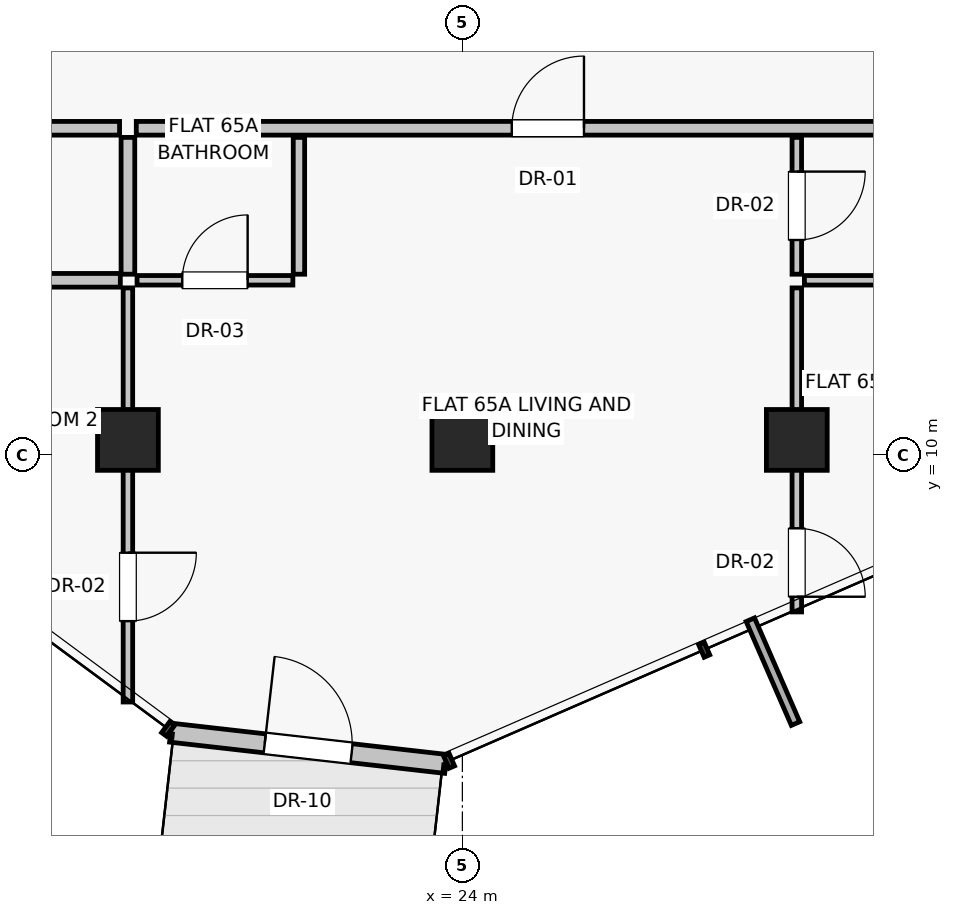
"""IFC4 building model, lengths in metres.
Left out: names, types, materials, properties, quantities, classifications, styles, units other than length and angle.
Written with IfcOpenShell. Run it as: python <this file> out.ifc"""

import sys

from ifc_helpers import new_model, si_unit, direction, frame, frame_2d, origin, origin_2d, place, context, subcontext, project, spatial, rectangle, extrude, source, transform, mapped, element, fill, save


model = new_model("IFC4")
c1 = context("Model", 3, precision=1e-05, world=origin(), true_north=direction((0.0, 1.0)))
c2 = subcontext(c1, "Body", "Model", "MODEL_VIEW")
j1 = project(units=[si_unit("LENGTHUNIT", "METRE"), si_unit("PLANEANGLEUNIT", "RADIAN")], contexts=[c1])
p1 = place(None, origin())
s1 = spatial("IfcSite", under=j1, at=p1, CompositionType="ELEMENT")
p2 = place(p1, origin())
s2 = spatial("IfcBuilding", under=s1, at=p2, CompositionType="ELEMENT")
p3 = place(p2, frame((0.0, 0.0, 230.05)))
s3 = spatial("IfcBuildingStorey", under=s2, at=p3, CompositionType="ELEMENT", Elevation=230.05)
for number, where, z_axis, x_axis in (
    (1, (19.6, 10.2, -0.235), (0.0, 0.0, 1.0), (1.0, 0.0, 0.0)),
    (2, (24.0, 10.2, -0.235), (0.0, 0.0, 1.0), (1.0, 0.0, 0.0)),
    (3, (28.4, 10.2, -0.235), (0.0, 0.0, 1.0), (1.0, 0.0, 0.0)),
):
    element("IfcColumn", number, at=place(p3, frame(where, z_axis=z_axis, x_axis=x_axis)), inside=s3, PredefinedType="COLUMN", context=c2, shape_type="SweptSolid", body=[
        extrude(rectangle(XDim=0.8, YDim=0.8, at=origin_2d()), origin(), (0.0, 0.0, 1.0), 3.485),
    ])
p4 = place(p3, frame((20.162, 6.349, 0.0), z_axis=(0.0, 0.0, 1.0), x_axis=(0.993617723706, -0.112799907521, 0.0)))
e4 = element("IfcWall", 4, at=p4, inside=s3, PredefinedType="SOLIDWALL", context=c2, shape_type="SweptSolid", body=[
    extrude(rectangle(XDim=3.643, YDim=0.25, at=frame_2d((1.821, 0.0))), origin(), (0.0, 0.0, 1.0), 3.015),
])
p5 = place(p4, frame((1.246, 0.0, 0.0)))
e5 = element("IfcOpeningElement", 5, at=p5, cuts=e4, PredefinedType="OPENING", context=c2, shape_type="SweptSolid", body=[
    extrude(rectangle(XDim=1.15, YDim=2.25, at=frame_2d((0.575, 1.125))), frame((0.0, 0.135, 0.0), z_axis=(0.0, -1.0, 0.0), x_axis=(1.0, 0.0, 0.0)), (0.0, 0.0, 1.0), 0.27),
])
p6 = place(p3, frame((15.31, 14.3, 0.0), z_axis=(0.0, 0.0, 1.0), x_axis=(1.0, 0.0, 0.0)))
e6 = element("IfcWall", 6, at=p6, inside=s3, PredefinedType="PARTITIONING", context=c2, shape_type="SweptSolid", body=[
    extrude(rectangle(XDim=4.18, YDim=0.18, at=frame_2d((2.09, 0.0))), origin(), (0.0, 0.0, 1.0), 3.015),
])
p7 = place(p6, frame((1.59, 0.0, 0.0)))
e7 = element("IfcOpeningElement", 7, at=p7, cuts=e6, PredefinedType="OPENING", context=c2, shape_type="SweptSolid", body=[
    extrude(rectangle(XDim=1.0, YDim=2.01, at=frame_2d((0.5, 1.005))), frame((0.0, 0.1, 0.0), z_axis=(0.0, -1.0, 0.0), x_axis=(1.0, 0.0, 0.0)), (0.0, 0.0, 1.0), 0.2),
])
p8 = place(p3, frame((19.71, 14.3, 0.0), z_axis=(0.0, 0.0, 1.0), x_axis=(1.0, 0.0, 0.0)))
e8 = element("IfcWall", 8, at=p8, inside=s3, PredefinedType="PARTITIONING", context=c2, shape_type="SweptSolid", body=[
    extrude(rectangle(XDim=11.38, YDim=0.18, at=frame_2d((5.69, 0.0))), origin(), (0.0, 0.0, 1.0), 3.015),
])
p9 = place(p8, frame((4.94, 0.0, 0.0)))
e9 = element("IfcOpeningElement", 9, at=p9, cuts=e8, PredefinedType="OPENING", context=c2, shape_type="SweptSolid", body=[
    extrude(rectangle(XDim=0.95, YDim=2.02, at=frame_2d((0.475, 1.01))), frame((0.0, 0.1, 0.0), z_axis=(0.0, -1.0, 0.0), x_axis=(1.0, 0.0, 0.0)), (0.0, 0.0, 1.0), 0.2),
])
p10 = place(p3, frame((15.32, 12.3, 0.0), z_axis=(0.0, 0.0, 1.0), x_axis=(1.0, 0.0, 0.0)))
e10 = element("IfcWall", 10, at=p10, inside=s3, PredefinedType="PARTITIONING", context=c2, shape_type="SweptSolid", body=[
    extrude(rectangle(XDim=4.18, YDim=0.18, at=frame_2d((2.09, 0.0))), origin(), (0.0, 0.0, 1.0), 3.015),
])
p11 = place(p3, frame((19.6, 14.18, 0.0), z_axis=(0.0, 0.0, 1.0), x_axis=(0.0, -1.0, 0.0)))
e11 = element("IfcWall", 11, at=p11, inside=s3, PredefinedType="PARTITIONING", context=c2, shape_type="SweptSolid", body=[
    extrude(rectangle(XDim=1.8, YDim=0.18, at=frame_2d((0.9, 0.0))), origin(), (0.0, 0.0, 1.0), 2.543),
])
p12 = place(p3, frame((19.6, 12.2, 0.0), z_axis=(0.0, 0.0, 1.0), x_axis=(0.0, -1.0, 0.0)))
e12 = element("IfcWall", 12, at=p12, inside=s3, PredefinedType="PARTITIONING", context=c2, shape_type="SweptSolid", body=[
    extrude(rectangle(XDim=5.448, YDim=0.125, at=frame_2d((2.724, 0.0))), origin(), (0.0, 0.0, 1.0), 2.543),
])
p13 = place(p12, frame((3.484, 0.0, 0.0)))
e13 = element("IfcOpeningElement", 13, at=p13, cuts=e12, PredefinedType="OPENING", context=c2, shape_type="SweptSolid", body=[
    extrude(rectangle(XDim=0.9, YDim=2.01, at=frame_2d((0.45, 1.005))), frame((0.0, 0.073, 0.0), z_axis=(0.0, -1.0, 0.0), x_axis=(1.0, 0.0, 0.0)), (0.0, 0.0, 1.0), 0.145),
])
p14 = place(p3, frame((21.85, 14.18, 0.0), z_axis=(0.0, 0.0, 1.0), x_axis=(0.0, -1.0, 0.0)))
e14 = element("IfcWall", 14, at=p14, inside=s3, PredefinedType="PARTITIONING", context=c2, shape_type="SweptSolid", body=[
    extrude(rectangle(XDim=1.8, YDim=0.15, at=frame_2d((0.9, 0.0))), origin(), (0.0, 0.0, 1.0), 3.015),
])
p15 = place(p3, frame((19.72, 12.3, 0.0), z_axis=(0.0, 0.0, 1.0), x_axis=(1.0, 0.0, 0.0)))
e15 = element("IfcWall", 15, at=p15, inside=s3, PredefinedType="PARTITIONING", context=c2, shape_type="SweptSolid", body=[
    extrude(rectangle(XDim=2.05, YDim=0.125, at=frame_2d((1.025, 0.0))), origin(), (0.0, 0.0, 1.0), 3.015),
])
p16 = place(p15, frame((0.595, 0.0, 0.0)))
e16 = element("IfcOpeningElement", 16, at=p16, cuts=e15, PredefinedType="OPENING", context=c2, shape_type="SweptSolid", body=[
    extrude(rectangle(XDim=0.86, YDim=2.01, at=frame_2d((0.43, 1.005))), frame((0.0, 0.073, 0.0), z_axis=(0.0, -1.0, 0.0), x_axis=(1.0, 0.0, 0.0)), (0.0, 0.0, 1.0), 0.145),
])
p17 = place(p3, frame((28.4, 14.18, 0.0), z_axis=(0.0, 0.0, 1.0), x_axis=(0.0, -1.0, 0.0)))
e17 = element("IfcWall", 17, at=p17, inside=s3, PredefinedType="PARTITIONING", context=c2, shape_type="SweptSolid", body=[
    extrude(rectangle(XDim=1.8, YDim=0.125, at=frame_2d((0.9, 0.0))), origin(), (0.0, 0.0, 1.0), 3.015),
])
p18 = place(p17, frame((0.45, 0.0, 0.0)))
e18 = element("IfcOpeningElement", 18, at=p18, cuts=e17, PredefinedType="OPENING", context=c2, shape_type="SweptSolid", body=[
    extrude(rectangle(XDim=0.9, YDim=2.01, at=frame_2d((0.45, 1.005))), frame((0.0, 0.073, 0.0), z_axis=(0.0, -1.0, 0.0), x_axis=(1.0, 0.0, 0.0)), (0.0, 0.0, 1.0), 0.145),
])
p19 = place(p3, frame((28.5, 12.3, 0.0), z_axis=(0.0, 0.0, 1.0), x_axis=(1.0, 0.0, 0.0)))
e19 = element("IfcWall", 19, at=p19, inside=s3, PredefinedType="PARTITIONING", context=c2, shape_type="SweptSolid", body=[
    extrude(rectangle(XDim=2.58, YDim=0.125, at=frame_2d((1.29, 0.0))), origin(), (0.0, 0.0, 1.0), 3.015),
])
p20 = place(p3, frame((28.4, 12.2, 0.0), z_axis=(0.0, 0.0, 1.0), x_axis=(0.0, -1.0, 0.0)))
e20 = element("IfcWall", 20, at=p20, inside=s3, PredefinedType="PARTITIONING", context=c2, shape_type="SweptSolid", body=[
    extrude(rectangle(XDim=4.263, YDim=0.125, at=frame_2d((2.131, 0.0))), origin(), (0.0, 0.0, 1.0), 3.015),
])
p21 = place(p20, frame((3.163, 0.0, 0.0)))
e21 = element("IfcOpeningElement", 21, at=p21, cuts=e20, PredefinedType="OPENING", context=c2, shape_type="SweptSolid", body=[
    extrude(rectangle(XDim=0.9, YDim=2.01, at=frame_2d((0.45, 1.005))), frame((0.0, 0.073, 0.0), z_axis=(0.0, -1.0, 0.0), x_axis=(1.0, 0.0, 0.0)), (0.0, 0.0, 1.0), 0.145),
])
m1 = source(origin(), c2, "Body", "SweptSolid", [
    extrude(rectangle(XDim=1.15, YDim=2.25, at=frame_2d((0.575, 1.125))), frame((0.0, 0.025, 0.0), z_axis=(0.0, -1.0, 0.0), x_axis=(1.0, 0.0, 0.0)), (0.0, 0.0, 1.0), 0.05),
])
p22 = place(p5, frame((1.15, 0.0, 0.0), z_axis=(0.0, 0.0, 1.0), x_axis=(-1.0, 0.0, 0.0)))
e22 = element("IfcDoor", 22, at=p22, inside=s3, OperationType="SINGLE_SWING_LEFT", PredefinedType="DOOR", context=c2, shape_type="MappedRepresentation", body=[
    mapped(m1, transform((0.0, 0.0, 0.0), scale=1.0)),
])
fill(e5, e22)
m2 = source(origin(), c2, "Body", "SweptSolid", [
    extrude(rectangle(XDim=0.95, YDim=2.02, at=frame_2d((0.475, 1.01))), frame((0.0, 0.025, 0.0), z_axis=(0.0, -1.0, 0.0), x_axis=(1.0, 0.0, 0.0)), (0.0, 0.0, 1.0), 0.05),
])
p23 = place(p9, origin())
e23 = element("IfcDoor", 23, at=p23, inside=s3, OperationType="SINGLE_SWING_RIGHT", PredefinedType="DOOR", context=c2, shape_type="MappedRepresentation", body=[
    mapped(m2, transform((0.0, 0.0, 0.0), scale=1.0)),
])
fill(e9, e23)
m3 = source(origin(), c2, "Body", "SweptSolid", [
    extrude(rectangle(XDim=0.9, YDim=2.01, at=frame_2d((0.45, 1.005))), frame((0.0, 0.025, 0.0), z_axis=(0.0, -1.0, 0.0), x_axis=(1.0, 0.0, 0.0)), (0.0, 0.0, 1.0), 0.05),
])
p24 = place(p13, origin())
e24 = element("IfcDoor", 24, at=p24, inside=s3, OperationType="SINGLE_SWING_LEFT", PredefinedType="DOOR", context=c2, shape_type="MappedRepresentation", body=[
    mapped(m3, transform((0.0, 0.0, 0.0), scale=1.0)),
])
fill(e13, e24)
m4 = source(origin(), c2, "Body", "SweptSolid", [
    extrude(rectangle(XDim=0.86, YDim=2.01, at=frame_2d((0.43, 1.005))), frame((0.0, 0.025, 0.0), z_axis=(0.0, -1.0, 0.0), x_axis=(1.0, 0.0, 0.0)), (0.0, 0.0, 1.0), 0.05),
])
p25 = place(p16, origin())
e25 = element("IfcDoor", 25, at=p25, inside=s3, OperationType="SINGLE_SWING_RIGHT", PredefinedType="DOOR", context=c2, shape_type="MappedRepresentation", body=[
    mapped(m4, transform((0.0, 0.0, 0.0), scale=1.0)),
])
fill(e16, e25)
p26 = place(p18, origin())
e26 = element("IfcDoor", 26, at=p26, inside=s3, OperationType="SINGLE_SWING_LEFT", PredefinedType="DOOR", context=c2, shape_type="MappedRepresentation", body=[
    mapped(m3, transform((0.0, 0.0, 0.0), scale=1.0)),
])
fill(e18, e26)
p27 = place(p21, origin())
e27 = element("IfcDoor", 27, at=p27, inside=s3, OperationType="SINGLE_SWING_RIGHT", PredefinedType="DOOR", context=c2, shape_type="MappedRepresentation", body=[
    mapped(m3, transform((0.0, 0.0, 0.0), scale=1.0)),
])
fill(e21, e27)
save(model, sys.argv[1])
